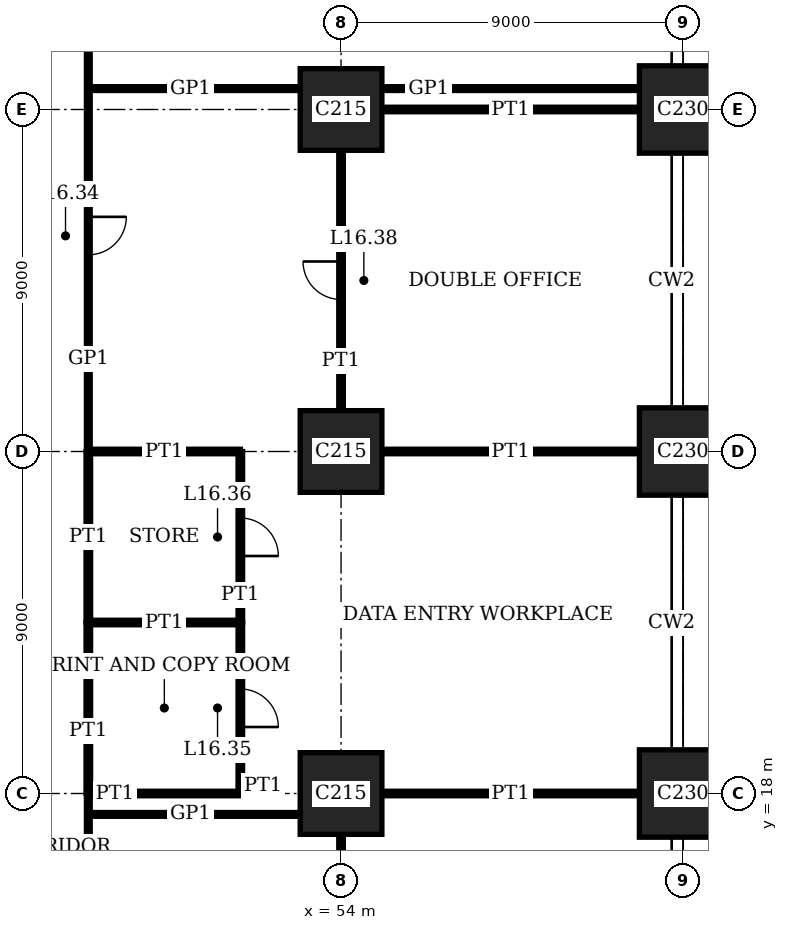
"""IFC4 building model, lengths in metres.
Left out: names, types, materials, properties, quantities, classifications, styles, units other than length and angle.
Written with IfcOpenShell. Run it as: python <this file> out.ifc"""

import sys

from ifc_helpers import new_model, si_unit, direction, frame, frame_2d, origin, origin_2d, place, context, subcontext, project, spatial, rectangle, extrude, element, fill, save


model = new_model("IFC4")
c1 = context("Model", 3, precision=1e-05, world=origin(), true_north=direction((0.0, 1.0)))
c2 = subcontext(c1, "Body", "Model", "MODEL_VIEW")
j1 = project(units=[si_unit("LENGTHUNIT", "METRE"), si_unit("PLANEANGLEUNIT", "RADIAN")], contexts=[c1])
p1 = place(None, origin())
s1 = spatial("IfcSite", under=j1, at=p1, CompositionType="ELEMENT")
p2 = place(p1, origin())
s2 = spatial("IfcBuilding", under=s1, at=p2, CompositionType="ELEMENT")
p3 = place(p2, frame((0.0, 0.0, 67.8)))
s3 = spatial("IfcBuildingStorey", under=s2, at=p3, CompositionType="ELEMENT", Elevation=67.8)
for number, where, z_axis, x_axis in (
    (1, (54.0, 18.0, 0.0), (0.0, 0.0, 1.0), (1.0, 0.0, 0.0)),
    (2, (54.0, 27.0, 0.0), (0.0, 0.0, 1.0), (1.0, 0.0, 0.0)),
    (3, (54.0, 36.0, 0.0), (0.0, 0.0, 1.0), (1.0, 0.0, 0.0)),
):
    element("IfcColumn", number, at=place(p3, frame(where, z_axis=z_axis, x_axis=x_axis)), inside=s3, PredefinedType="COLUMN", context=c2, shape_type="SweptSolid", body=[
        extrude(rectangle(XDim=2.15, YDim=2.15, at=origin_2d()), origin(), (0.0, 0.0, 1.0), 4.0),
    ])
for number, where, z_axis, x_axis in (
    (4, (63.0, 18.0, 0.0), (0.0, 0.0, 1.0), (1.0, 0.0, 0.0)),
    (5, (63.0, 27.0, 0.0), (0.0, 0.0, 1.0), (1.0, 0.0, 0.0)),
    (6, (63.0, 36.0, 0.0), (0.0, 0.0, 1.0), (1.0, 0.0, 0.0)),
):
    element("IfcColumn", number, at=place(p3, frame(where, z_axis=z_axis, x_axis=x_axis)), inside=s3, PredefinedType="COLUMN", context=c2, shape_type="SweptSolid", body=[
        extrude(rectangle(XDim=2.3, YDim=2.3, at=origin_2d()), origin(), (0.0, 0.0, 1.0), 4.0),
    ])
p4 = place(p3, frame((47.35, 17.45, 0.0), z_axis=(0.0, 0.0, 1.0), x_axis=(1.0, 0.0, 0.0)))
e7 = element("IfcWall", 7, at=p4, inside=s3, PredefinedType="PARTITIONING", context=c2, shape_type="SweptSolid", body=[
    extrude(rectangle(XDim=5.575, YDim=0.1, at=frame_2d((2.788, 0.0))), origin(), (0.0, 0.0, 1.0), 3.05),
])
p5 = place(p3, frame((47.35, 18.0, 0.0), z_axis=(0.0, 0.0, 1.0), x_axis=(1.0, 0.0, 0.0)))
e8 = element("IfcWall", 8, at=p5, inside=s3, PredefinedType="PARTITIONING", context=c2, shape_type="SweptSolid", body=[
    extrude(rectangle(XDim=4.0, YDim=0.12, at=frame_2d((2.0, 0.0))), origin(), (0.0, 0.0, 1.0), 3.05),
])
p6 = place(p3, frame((55.075, 18.0, 0.0), z_axis=(0.0, 0.0, 1.0), x_axis=(1.0, 0.0, 0.0)))
e9 = element("IfcWall", 9, at=p6, inside=s3, PredefinedType="PARTITIONING", context=c2, shape_type="SweptSolid", body=[
    extrude(rectangle(XDim=6.775, YDim=0.12, at=frame_2d((3.388, 0.0))), origin(), (0.0, 0.0, 1.0), 3.05),
])
p7 = place(p3, frame((47.35, 22.5, 0.0), z_axis=(0.0, 0.0, 1.0), x_axis=(1.0, 0.0, 0.0)))
e10 = element("IfcWall", 10, at=p7, inside=s3, PredefinedType="PARTITIONING", context=c2, shape_type="SweptSolid", body=[
    extrude(rectangle(XDim=4.0, YDim=0.12, at=frame_2d((2.0, 0.0))), origin(), (0.0, 0.0, 1.0), 3.1),
])
p8 = place(p3, frame((47.35, 27.0, 0.0), z_axis=(0.0, 0.0, 1.0), x_axis=(1.0, 0.0, 0.0)))
e11 = element("IfcWall", 11, at=p8, inside=s3, PredefinedType="PARTITIONING", context=c2, shape_type="SweptSolid", body=[
    extrude(rectangle(XDim=4.0, YDim=0.12, at=frame_2d((2.0, 0.0))), origin(), (0.0, 0.0, 1.0), 3.05),
])
for number, where, z_axis, x_axis in (
    (12, (55.075, 27.0, 0.0), (0.0, 0.0, 1.0), (1.0, 0.0, 0.0)),
    (13, (55.075, 36.0, 0.0), (0.0, 0.0, 1.0), (1.0, 0.0, 0.0)),
):
    element("IfcWall", number, at=place(p3, frame(where, z_axis=z_axis, x_axis=x_axis)), inside=s3, PredefinedType="PARTITIONING", context=c2, shape_type="SweptSolid", body=[
        extrude(rectangle(XDim=6.775, YDim=0.12, at=frame_2d((3.388, 0.0))), origin(), (0.0, 0.0, 1.0), 3.05),
    ])
p9 = place(p3, frame((47.35, 36.55, 0.0), z_axis=(0.0, 0.0, 1.0), x_axis=(1.0, 0.0, 0.0)))
e14 = element("IfcWall", 14, at=p9, inside=s3, PredefinedType="PARTITIONING", context=c2, shape_type="SweptSolid", body=[
    extrude(rectangle(XDim=5.575, YDim=0.1, at=frame_2d((2.788, 0.0))), origin(), (0.0, 0.0, 1.0), 3.05),
])
p10 = place(p3, frame((55.075, 36.55, 0.0), z_axis=(0.0, 0.0, 1.0), x_axis=(1.0, 0.0, 0.0)))
e15 = element("IfcWall", 15, at=p10, inside=s3, PredefinedType="PARTITIONING", context=c2, shape_type="SweptSolid", body=[
    extrude(rectangle(XDim=6.775, YDim=0.1, at=frame_2d((3.388, 0.0))), origin(), (0.0, 0.0, 1.0), 3.05),
])
for number, where, z_axis, x_axis in (
    (16, (47.35, 18.0, 0.0), (0.0, 0.0, 1.0), (0.0, 1.0, 0.0)),
    (17, (47.35, 22.5, 0.0), (0.0, 0.0, 1.0), (0.0, 1.0, 0.0)),
):
    element("IfcWall", number, at=place(p3, frame(where, z_axis=z_axis, x_axis=x_axis)), inside=s3, PredefinedType="PARTITIONING", context=c2, shape_type="SweptSolid", body=[
        extrude(rectangle(XDim=4.5, YDim=0.12, at=frame_2d((2.25, 0.0))), origin(), (0.0, 0.0, 1.0), 3.75),
    ])
p11 = place(p3, frame((47.35, 15.65, 0.0), z_axis=(0.0, 0.0, 1.0), x_axis=(0.0, 1.0, 0.0)))
e18 = element("IfcWall", 18, at=p11, inside=s3, PredefinedType="PARTITIONING", context=c2, shape_type="SweptSolid", body=[
    extrude(rectangle(XDim=2.35, YDim=0.1, at=frame_2d((1.175, 0.0))), origin(), (0.0, 0.0, 1.0), 3.75),
])
p12 = place(p3, frame((47.35, 27.0, 0.0), z_axis=(0.0, 0.0, 1.0), x_axis=(0.0, 1.0, 0.0)))
e19 = element("IfcWall", 19, at=p12, inside=s3, PredefinedType="PARTITIONING", context=c2, shape_type="SweptSolid", body=[
    extrude(rectangle(XDim=11.35, YDim=0.1, at=frame_2d((5.675, 0.0))), origin(), (0.0, 0.0, 1.0), 3.75),
])
p13 = place(p12, frame((5.175, 0.0, 0.0)))
e20 = element("IfcOpeningElement", 20, at=p13, cuts=e19, PredefinedType="OPENING", context=c2, shape_type="SweptSolid", body=[
    extrude(rectangle(XDim=1.0, YDim=2.4, at=frame_2d((0.5, 1.2))), frame((0.0, 0.06, 0.0), z_axis=(0.0, -1.0, 0.0), x_axis=(1.0, 0.0, 0.0)), (0.0, 0.0, 1.0), 0.12),
])
p14 = place(p3, frame((51.35, 18.0, 0.0), z_axis=(0.0, 0.0, 1.0), x_axis=(0.0, 1.0, 0.0)))
e21 = element("IfcWall", 21, at=p14, inside=s3, PredefinedType="PARTITIONING", context=c2, shape_type="SweptSolid", body=[
    extrude(rectangle(XDim=4.5, YDim=0.12, at=frame_2d((2.25, 0.0))), origin(), (0.0, 0.0, 1.0), 3.75),
])
p15 = place(p14, frame((1.75, 0.0, 0.0)))
e22 = element("IfcOpeningElement", 22, at=p15, cuts=e21, PredefinedType="OPENING", context=c2, shape_type="SweptSolid", body=[
    extrude(rectangle(XDim=1.0, YDim=2.4, at=frame_2d((0.5, 1.2))), frame((0.0, 0.07, 0.0), z_axis=(0.0, -1.0, 0.0), x_axis=(1.0, 0.0, 0.0)), (0.0, 0.0, 1.0), 0.14),
])
p16 = place(p3, frame((51.35, 22.5, 0.0), z_axis=(0.0, 0.0, 1.0), x_axis=(0.0, 1.0, 0.0)))
e23 = element("IfcWall", 23, at=p16, inside=s3, PredefinedType="PARTITIONING", context=c2, shape_type="SweptSolid", body=[
    extrude(rectangle(XDim=4.5, YDim=0.12, at=frame_2d((2.25, 0.0))), origin(), (0.0, 0.0, 1.0), 3.75),
])
p17 = place(p16, frame((1.75, 0.0, 0.0)))
e24 = element("IfcOpeningElement", 24, at=p17, cuts=e23, PredefinedType="OPENING", context=c2, shape_type="SweptSolid", body=[
    extrude(rectangle(XDim=1.0, YDim=2.4, at=frame_2d((0.5, 1.2))), frame((0.0, 0.07, 0.0), z_axis=(0.0, -1.0, 0.0), x_axis=(1.0, 0.0, 0.0)), (0.0, 0.0, 1.0), 0.14),
])
p18 = place(p3, frame((54.0, 10.075, 0.0), z_axis=(0.0, 0.0, 1.0), x_axis=(0.0, 1.0, 0.0)))
e25 = element("IfcWall", 25, at=p18, inside=s3, PredefinedType="PARTITIONING", context=c2, shape_type="SweptSolid", body=[
    extrude(rectangle(XDim=6.85, YDim=0.12, at=frame_2d((3.425, 0.0))), origin(), (0.0, 0.0, 1.0), 3.05),
])
p19 = place(p18, frame((2.925, 0.0, 0.0)))
e26 = element("IfcOpeningElement", 26, at=p19, cuts=e25, PredefinedType="OPENING", context=c2, shape_type="SweptSolid", body=[
    extrude(rectangle(XDim=1.0, YDim=2.4, at=frame_2d((0.5, 1.2))), frame((0.0, 0.07, 0.0), z_axis=(0.0, -1.0, 0.0), x_axis=(1.0, 0.0, 0.0)), (0.0, 0.0, 1.0), 0.14),
])
p20 = place(p3, frame((54.0, 28.075, 0.0), z_axis=(0.0, 0.0, 1.0), x_axis=(0.0, 1.0, 0.0)))
e27 = element("IfcWall", 27, at=p20, inside=s3, PredefinedType="PARTITIONING", context=c2, shape_type="SweptSolid", body=[
    extrude(rectangle(XDim=6.85, YDim=0.12, at=frame_2d((3.425, 0.0))), origin(), (0.0, 0.0, 1.0), 3.05),
])
p21 = place(p20, frame((2.925, 0.0, 0.0)))
e28 = element("IfcOpeningElement", 28, at=p21, cuts=e27, PredefinedType="OPENING", context=c2, shape_type="SweptSolid", body=[
    extrude(rectangle(XDim=1.0, YDim=2.4, at=frame_2d((0.5, 1.2))), frame((0.0, 0.07, 0.0), z_axis=(0.0, -1.0, 0.0), x_axis=(1.0, 0.0, 0.0)), (0.0, 0.0, 1.0), 0.14),
])
p22 = place(p13, origin())
e29 = element("IfcDoor", 29, at=p22, inside=s3, OperationType="SINGLE_SWING_RIGHT", PredefinedType="DOOR", context=c2, shape_type="SweptSolid", body=[
    extrude(rectangle(XDim=1.0, YDim=2.4, at=frame_2d((0.5, 1.2))), frame((0.0, 0.02, 0.0), z_axis=(0.0, -1.0, 0.0), x_axis=(1.0, 0.0, 0.0)), (0.0, 0.0, 1.0), 0.04),
])
fill(e20, e29)
p23 = place(p15, origin())
e30 = element("IfcDoor", 30, at=p23, inside=s3, OperationType="SINGLE_SWING_LEFT", PredefinedType="DOOR", context=c2, shape_type="SweptSolid", body=[
    extrude(rectangle(XDim=1.0, YDim=2.4, at=frame_2d((0.5, 1.2))), frame((0.0, 0.025, 0.0), z_axis=(0.0, -1.0, 0.0), x_axis=(1.0, 0.0, 0.0)), (0.0, 0.0, 1.0), 0.05),
])
fill(e22, e30)
p24 = place(p17, origin())
e31 = element("IfcDoor", 31, at=p24, inside=s3, OperationType="SINGLE_SWING_LEFT", PredefinedType="DOOR", context=c2, shape_type="SweptSolid", body=[
    extrude(rectangle(XDim=1.0, YDim=2.4, at=frame_2d((0.5, 1.2))), frame((0.0, 0.025, 0.0), z_axis=(0.0, -1.0, 0.0), x_axis=(1.0, 0.0, 0.0)), (0.0, 0.0, 1.0), 0.05),
])
fill(e24, e31)
p25 = place(p21, origin())
e32 = element("IfcDoor", 32, at=p25, inside=s3, OperationType="SINGLE_SWING_LEFT", PredefinedType="DOOR", context=c2, shape_type="SweptSolid", body=[
    extrude(rectangle(XDim=1.0, YDim=2.4, at=frame_2d((0.5, 1.2))), frame((0.0, 0.025, 0.0), z_axis=(0.0, -1.0, 0.0), x_axis=(1.0, 0.0, 0.0)), (0.0, 0.0, 1.0), 0.05),
])
fill(e28, e32)
save(model, sys.argv[1])
